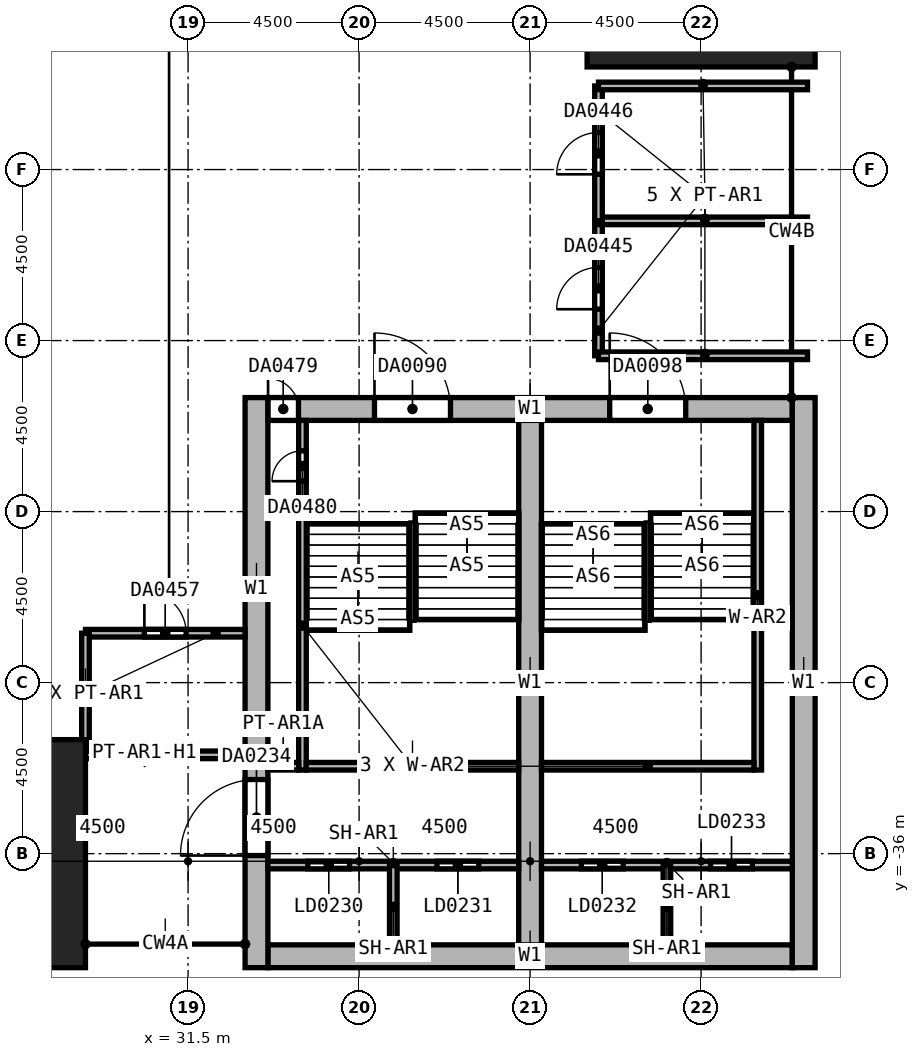
"""IFC4 building model, lengths in metres.
Left out: names, types, materials, properties, quantities, classifications, styles, units other than length and angle.
Written with IfcOpenShell. Run it as: python <this file> out.ifc"""

import sys

from ifc_helpers import new_model, si_unit, direction, frame, frame_2d, origin, origin_2d, place, context, subcontext, project, spatial, rectangle, extrude, element, fill, save


model = new_model("IFC4")
c1 = context("Model", 3, precision=1e-05, world=origin(), true_north=direction((0.0, 1.0)))
c2 = subcontext(c1, "Body", "Model", "MODEL_VIEW")
j1 = project(units=[si_unit("LENGTHUNIT", "METRE"), si_unit("PLANEANGLEUNIT", "RADIAN")], contexts=[c1])
p1 = place(None, origin())
s1 = spatial("IfcSite", under=j1, at=p1, CompositionType="ELEMENT")
p2 = place(p1, origin())
s2 = spatial("IfcBuilding", under=s1, at=p2, CompositionType="ELEMENT")
p3 = place(p2, frame((0.0, 0.0, 37.0)))
s3 = spatial("IfcBuildingStorey", under=s2, at=p3, CompositionType="ELEMENT", Elevation=37.0)
for number, where, z_axis, x_axis in (
    (1, (27.0, -36.0, 0.0), (0.0, 0.0, 1.0), (1.0, 0.0, 0.0)),
    (2, (45.0, -13.5, 0.0), (0.0, 0.0, 1.0), (0.0, 1.0, 0.0)),
):
    element("IfcColumn", number, at=place(p3, frame(where, z_axis=z_axis, x_axis=x_axis)), inside=s3, PredefinedType="COLUMN", context=c2, shape_type="SweptSolid", body=[
        extrude(rectangle(XDim=3.6, YDim=6.0, at=origin_2d()), origin(), (0.0, 0.0, 1.0), 5.8),
    ])
p4 = place(p3, frame((33.6, -24.3, 0.0), z_axis=(0.0, 0.0, 1.0), x_axis=(1.0, 0.0, 0.0)))
e3 = element("IfcWall", 3, at=p4, inside=s3, PredefinedType="SHEAR", context=c2, shape_type="SweptSolid", body=[
    extrude(rectangle(XDim=13.8, YDim=0.6, at=frame_2d((6.9, 0.0))), origin(), (0.0, 0.0, 1.0), 7.0),
])
p5 = place(p4, frame((2.805, 0.0, 0.0)))
e4 = element("IfcOpeningElement", 4, at=p5, cuts=e3, PredefinedType="OPENING", context=c2, shape_type="SweptSolid", body=[
    extrude(rectangle(XDim=2.0, YDim=2.4, at=frame_2d((1.0, 1.2))), frame((0.0, 0.3, 0.0), z_axis=(0.0, -1.0, 0.0), x_axis=(1.0, 0.0, 0.0)), (0.0, 0.0, 1.0), 0.6),
])
p6 = place(p4, frame((8.995, 0.0, 0.0)))
e5 = element("IfcOpeningElement", 5, at=p6, cuts=e3, PredefinedType="OPENING", context=c2, shape_type="SweptSolid", body=[
    extrude(rectangle(XDim=2.0, YDim=2.4, at=frame_2d((1.0, 1.2))), frame((0.0, 0.3, 0.0), z_axis=(0.0, -1.0, 0.0), x_axis=(1.0, 0.0, 0.0)), (0.0, 0.0, 1.0), 0.6),
])
p7 = place(p4, frame((0.005, 0.0, 0.0)))
e6 = element("IfcOpeningElement", 6, at=p7, cuts=e3, PredefinedType="OPENING", context=c2, shape_type="SweptSolid", body=[
    extrude(rectangle(XDim=0.8, YDim=2.1, at=frame_2d((0.4, 1.05))), frame((0.0, 0.3, 0.0), z_axis=(0.0, -1.0, 0.0), x_axis=(1.0, 0.0, 0.0)), (0.0, 0.0, 1.0), 0.6),
])
p8 = place(p3, frame((33.6, -38.7, 0.0), z_axis=(0.0, 0.0, 1.0), x_axis=(1.0, 0.0, 0.0)))
e7 = element("IfcWall", 7, at=p8, inside=s3, PredefinedType="SHEAR", context=c2, shape_type="SweptSolid", body=[
    extrude(rectangle(XDim=13.8, YDim=0.6, at=frame_2d((6.9, 0.0))), origin(), (0.0, 0.0, 1.0), 7.0),
])
p9 = place(p3, frame((33.3, -39.0, 0.0), z_axis=(0.0, 0.0, 1.0), x_axis=(0.0, 1.0, 0.0)))
e8 = element("IfcWall", 8, at=p9, inside=s3, PredefinedType="SHEAR", context=c2, shape_type="SweptSolid", body=[
    extrude(rectangle(XDim=15.0, YDim=0.6, at=frame_2d((7.5, 0.0))), origin(), (0.0, 0.0, 1.0), 7.0),
])
p10 = place(p9, frame((2.95, 0.0, 0.0)))
e9 = element("IfcOpeningElement", 9, at=p10, cuts=e8, PredefinedType="OPENING", context=c2, shape_type="SweptSolid", body=[
    extrude(rectangle(XDim=2.0, YDim=2.4, at=frame_2d((1.0, 1.2))), frame((0.0, 0.3, 0.0), z_axis=(0.0, -1.0, 0.0), x_axis=(1.0, 0.0, 0.0)), (0.0, 0.0, 1.0), 0.6),
])
p11 = place(p3, frame((47.7, -39.0, 0.0), z_axis=(0.0, 0.0, 1.0), x_axis=(0.0, 1.0, 0.0)))
e10 = element("IfcWall", 10, at=p11, inside=s3, PredefinedType="SHEAR", context=c2, shape_type="SweptSolid", body=[
    extrude(rectangle(XDim=15.0, YDim=0.6, at=frame_2d((7.5, 0.0))), origin(), (0.0, 0.0, 1.0), 7.0),
])
p12 = place(p3, frame((40.5, -38.4, 0.0), z_axis=(0.0, 0.0, 1.0), x_axis=(0.0, 1.0, 0.0)))
e11 = element("IfcWall", 11, at=p12, inside=s3, PredefinedType="SHEAR", context=c2, shape_type="SweptSolid", body=[
    extrude(rectangle(XDim=13.8, YDim=0.6, at=frame_2d((6.9, 0.0))), origin(), (0.0, 0.0, 1.0), 7.0),
])
p13 = place(p3, frame((34.51, -33.8, 0.0), z_axis=(0.0, 0.0, 1.0), x_axis=(0.0, 1.0, 0.0)))
e12 = element("IfcWall", 12, at=p13, inside=s3, PredefinedType="SOLIDWALL", context=c2, shape_type="SweptSolid", body=[
    extrude(rectangle(XDim=9.2, YDim=0.2, at=frame_2d((4.6, 0.0))), origin(), (0.0, 0.0, 1.0), 7.0),
])
p14 = place(p13, frame((7.6, 0.0, 0.0)))
e13 = element("IfcOpeningElement", 13, at=p14, cuts=e12, PredefinedType="OPENING", context=c2, shape_type="SweptSolid", body=[
    extrude(rectangle(XDim=0.8, YDim=2.1, at=frame_2d((0.4, 1.05))), frame((0.0, 0.1, 0.0), z_axis=(0.0, -1.0, 0.0), x_axis=(1.0, 0.0, 0.0)), (0.0, 0.0, 1.0), 0.2),
])
p15 = place(p3, frame((34.61, -33.7, 0.0), z_axis=(0.0, 0.0, 1.0), x_axis=(1.0, 0.0, 0.0)))
e14 = element("IfcWall", 14, at=p15, inside=s3, PredefinedType="SOLIDWALL", context=c2, shape_type="SweptSolid", body=[
    extrude(rectangle(XDim=5.59, YDim=0.2, at=frame_2d((2.795, 0.0))), origin(), (0.0, 0.0, 1.0), 7.0),
])
p16 = place(p3, frame((46.49, -33.8, 0.0), z_axis=(0.0, 0.0, 1.0), x_axis=(0.0, 1.0, 0.0)))
e15 = element("IfcWall", 15, at=p16, inside=s3, PredefinedType="SOLIDWALL", context=c2, shape_type="SweptSolid", body=[
    extrude(rectangle(XDim=9.2, YDim=0.2, at=frame_2d((4.6, 0.0))), origin(), (0.0, 0.0, 1.0), 7.0),
])
p17 = place(p3, frame((40.8, -33.7, 0.0), z_axis=(0.0, 0.0, 1.0), x_axis=(1.0, 0.0, 0.0)))
e16 = element("IfcWall", 16, at=p17, inside=s3, PredefinedType="SOLIDWALL", context=c2, shape_type="SweptSolid", body=[
    extrude(rectangle(XDim=5.59, YDim=0.2, at=frame_2d((2.795, 0.0))), origin(), (0.0, 0.0, 1.0), 7.0),
])
p18 = place(p3, frame((33.6, -36.3, 0.0), z_axis=(0.0, 0.0, 1.0), x_axis=(1.0, 0.0, 0.0)))
e17 = element("IfcWall", 17, at=p18, inside=s3, PredefinedType="SHEAR", context=c2, shape_type="SweptSolid", body=[
    extrude(rectangle(XDim=6.6, YDim=0.2, at=frame_2d((3.3, 0.0))), origin(), (0.0, 0.0, 1.0), 7.0),
])
p19 = place(p18, frame((1.05, 0.0, 0.0)))
e18 = element("IfcOpeningElement", 18, at=p19, cuts=e17, PredefinedType="OPENING", context=c2, shape_type="SweptSolid", body=[
    extrude(rectangle(XDim=1.1, YDim=2.4, at=frame_2d((0.55, 1.2))), frame((0.0, 0.1, 0.0), z_axis=(0.0, -1.0, 0.0), x_axis=(1.0, 0.0, 0.0)), (0.0, 0.0, 1.0), 0.2),
])
p20 = place(p18, frame((4.45, 0.0, 0.0)))
e19 = element("IfcOpeningElement", 19, at=p20, cuts=e17, PredefinedType="OPENING", context=c2, shape_type="SweptSolid", body=[
    extrude(rectangle(XDim=1.1, YDim=2.4, at=frame_2d((0.55, 1.2))), frame((0.0, 0.1, 0.0), z_axis=(0.0, -1.0, 0.0), x_axis=(1.0, 0.0, 0.0)), (0.0, 0.0, 1.0), 0.2),
])
p21 = place(p3, frame((40.8, -36.3, 0.0), z_axis=(0.0, 0.0, 1.0), x_axis=(1.0, 0.0, 0.0)))
e20 = element("IfcWall", 20, at=p21, inside=s3, PredefinedType="SHEAR", context=c2, shape_type="SweptSolid", body=[
    extrude(rectangle(XDim=6.6, YDim=0.2, at=frame_2d((3.3, 0.0))), origin(), (0.0, 0.0, 1.0), 7.0),
])
p22 = place(p21, frame((1.05, 0.0, 0.0)))
e21 = element("IfcOpeningElement", 21, at=p22, cuts=e20, PredefinedType="OPENING", context=c2, shape_type="SweptSolid", body=[
    extrude(rectangle(XDim=1.1, YDim=2.4, at=frame_2d((0.55, 1.2))), frame((0.0, 0.1, 0.0), z_axis=(0.0, -1.0, 0.0), x_axis=(1.0, 0.0, 0.0)), (0.0, 0.0, 1.0), 0.2),
])
p23 = place(p21, frame((4.45, 0.0, 0.0)))
e22 = element("IfcOpeningElement", 22, at=p23, cuts=e20, PredefinedType="OPENING", context=c2, shape_type="SweptSolid", body=[
    extrude(rectangle(XDim=1.1, YDim=2.4, at=frame_2d((0.55, 1.2))), frame((0.0, 0.1, 0.0), z_axis=(0.0, -1.0, 0.0), x_axis=(1.0, 0.0, 0.0)), (0.0, 0.0, 1.0), 0.2),
])
for number, where, z_axis, x_axis in (
    (23, (36.9, -38.4, 0.0), (0.0, 0.0, 1.0), (0.0, 1.0, 0.0)),
    (24, (44.1, -38.4, 0.0), (0.0, 0.0, 1.0), (0.0, 1.0, 0.0)),
):
    element("IfcWall", number, at=place(p3, frame(where, z_axis=z_axis, x_axis=x_axis)), inside=s3, PredefinedType="SHEAR", context=c2, shape_type="SweptSolid", body=[
        extrude(rectangle(XDim=2.1, YDim=0.2, at=frame_2d((1.05, 0.0))), origin(), (0.0, 0.0, 1.0), 7.0),
    ])
p24 = place(p3, frame((42.3, -22.9, 0.0), z_axis=(0.0, 0.0, 1.0), x_axis=(0.0, 1.0, 0.0)))
e25 = element("IfcWall", 25, at=p24, inside=s3, PredefinedType="PARTITIONING", context=c2, shape_type="SweptSolid", body=[
    extrude(rectangle(XDim=3.55, YDim=0.2, at=frame_2d((1.775, 0.0))), origin(), (0.0, 0.0, 1.0), 6.7),
])
p25 = place(p24, frame((1.225, 0.0, 0.0)))
e26 = element("IfcOpeningElement", 26, at=p25, cuts=e25, PredefinedType="OPENING", context=c2, shape_type="SweptSolid", body=[
    extrude(rectangle(XDim=1.1, YDim=2.4, at=frame_2d((0.55, 1.2))), frame((0.0, 0.1, 0.0), z_axis=(0.0, -1.0, 0.0), x_axis=(1.0, 0.0, 0.0)), (0.0, 0.0, 1.0), 0.2),
])
for number, where, z_axis, x_axis in (
    (27, (42.3, -22.9, 0.0), (0.0, 0.0, 1.0), (1.0, 0.0, 0.0)),
    (28, (42.3, -19.35, 0.0), (0.0, 0.0, 1.0), (1.0, 0.0, 0.0)),
):
    element("IfcWall", number, at=place(p3, frame(where, z_axis=z_axis, x_axis=x_axis)), inside=s3, PredefinedType="PARTITIONING", context=c2, shape_type="SweptSolid", body=[
        extrude(rectangle(XDim=5.5, YDim=0.2, at=frame_2d((2.75, 0.0))), origin(), (0.0, 0.0, 1.0), 6.7),
    ])
p26 = place(p3, frame((42.3, -19.35, 0.0), z_axis=(0.0, 0.0, 1.0), x_axis=(0.0, 1.0, 0.0)))
e29 = element("IfcWall", 29, at=p26, inside=s3, PredefinedType="PARTITIONING", context=c2, shape_type="SweptSolid", body=[
    extrude(rectangle(XDim=3.55, YDim=0.2, at=frame_2d((1.775, 0.0))), origin(), (0.0, 0.0, 1.0), 6.7),
])
p27 = place(p26, frame((1.225, 0.0, 0.0)))
e30 = element("IfcOpeningElement", 30, at=p27, cuts=e29, PredefinedType="OPENING", context=c2, shape_type="SweptSolid", body=[
    extrude(rectangle(XDim=1.1, YDim=2.4, at=frame_2d((0.55, 1.2))), frame((0.0, 0.1, 0.0), z_axis=(0.0, -1.0, 0.0), x_axis=(1.0, 0.0, 0.0)), (0.0, 0.0, 1.0), 0.2),
])
p28 = place(p3, frame((42.3, -15.8, 0.0), z_axis=(0.0, 0.0, 1.0), x_axis=(1.0, 0.0, 0.0)))
e31 = element("IfcWall", 31, at=p28, inside=s3, PredefinedType="PARTITIONING", context=c2, shape_type="SweptSolid", body=[
    extrude(rectangle(XDim=5.5, YDim=0.2, at=frame_2d((2.75, 0.0))), origin(), (0.0, 0.0, 1.0), 6.7),
])
p29 = place(p3, frame((28.8, -30.2, 0.0), z_axis=(0.0, 0.0, 1.0), x_axis=(1.0, 0.0, 0.0)))
e32 = element("IfcWall", 32, at=p29, inside=s3, PredefinedType="PARTITIONING", context=c2, shape_type="SweptSolid", body=[
    extrude(rectangle(XDim=4.2, YDim=0.2, at=frame_2d((2.1, 0.0))), origin(), (0.0, 0.0, 1.0), 6.7),
])
p30 = place(p29, frame((1.55, 0.0, 0.0)))
e33 = element("IfcOpeningElement", 33, at=p30, cuts=e32, PredefinedType="OPENING", context=c2, shape_type="SweptSolid", body=[
    extrude(rectangle(XDim=1.1, YDim=2.4, at=frame_2d((0.55, 1.2))), frame((0.0, 0.1, 0.0), z_axis=(0.0, -1.0, 0.0), x_axis=(1.0, 0.0, 0.0)), (0.0, 0.0, 1.0), 0.2),
])
p31 = place(p3, frame((28.8, -33.4, 0.0), z_axis=(0.0, 0.0, 1.0), x_axis=(0.0, 1.0, 0.0)))
e34 = element("IfcWall", 34, at=p31, inside=s3, PredefinedType="PARTITIONING", context=c2, shape_type="SweptSolid", body=[
    extrude(rectangle(XDim=3.2, YDim=0.2, at=frame_2d((1.6, 0.0))), origin(), (0.0, 0.0, 1.0), 6.7),
])
p32 = place(p3, frame((28.8, -33.4, 0.0), z_axis=(0.0, 0.0, 1.0), x_axis=(1.0, 0.0, 0.0)))
e35 = element("IfcWall", 35, at=p32, inside=s3, PredefinedType="PARTITIONING", context=c2, shape_type="SweptSolid", body=[
    extrude(rectangle(XDim=4.2, YDim=0.2, at=frame_2d((2.1, 0.0))), origin(), (0.0, 0.0, 1.0), 6.089),
])
p33 = place(p3, frame((33.6, -33.7, 0.0), z_axis=(0.0, 0.0, 1.0), x_axis=(1.0, 0.0, 0.0)))
e36 = element("IfcWall", 36, at=p33, inside=s3, PredefinedType="PARTITIONING", context=c2, shape_type="SweptSolid", body=[
    extrude(rectangle(XDim=0.81, YDim=0.2, at=frame_2d((0.405, 0.0))), origin(), (0.0, 0.0, 1.0), 7.0),
])
p34 = place(p5, frame((2.0, 0.0, 0.0), z_axis=(0.0, 0.0, 1.0), x_axis=(-1.0, 0.0, 0.0)))
e37 = element("IfcDoor", 37, at=p34, inside=s3, OperationType="DOUBLE_DOOR_SINGLE_SWING", PredefinedType="DOOR", context=c2, shape_type="SweptSolid", body=[
    extrude(rectangle(XDim=2.0, YDim=2.4, at=frame_2d((1.0, 1.2))), frame((0.0, 0.025, 0.0), z_axis=(0.0, -1.0, 0.0), x_axis=(1.0, 0.0, 0.0)), (0.0, 0.0, 1.0), 0.05),
])
fill(e4, e37)
p35 = place(p6, frame((2.0, 0.0, 0.0), z_axis=(0.0, 0.0, 1.0), x_axis=(-1.0, 0.0, 0.0)))
e38 = element("IfcDoor", 38, at=p35, inside=s3, OperationType="DOUBLE_DOOR_SINGLE_SWING", PredefinedType="DOOR", context=c2, shape_type="SweptSolid", body=[
    extrude(rectangle(XDim=2.0, YDim=2.4, at=frame_2d((1.0, 1.2))), frame((0.0, 0.025, 0.0), z_axis=(0.0, -1.0, 0.0), x_axis=(1.0, 0.0, 0.0)), (0.0, 0.0, 1.0), 0.05),
])
fill(e5, e38)
p36 = place(p19, frame((1.1, 0.0, 0.0), z_axis=(0.0, 0.0, 1.0), x_axis=(-1.0, 0.0, 0.0)))
e39 = element("IfcDoor", 39, at=p36, inside=s3, OperationType="DOUBLE_DOOR_SLIDING", PredefinedType="DOOR", context=c2, shape_type="SweptSolid", body=[
    extrude(rectangle(XDim=1.1, YDim=2.4, at=frame_2d((0.55, 1.2))), frame((0.0, 0.025, 0.0), z_axis=(0.0, -1.0, 0.0), x_axis=(1.0, 0.0, 0.0)), (0.0, 0.0, 1.0), 0.05),
])
fill(e18, e39)
p37 = place(p20, frame((1.1, 0.0, 0.0), z_axis=(0.0, 0.0, 1.0), x_axis=(-1.0, 0.0, 0.0)))
e40 = element("IfcDoor", 40, at=p37, inside=s3, OperationType="DOUBLE_DOOR_SLIDING", PredefinedType="DOOR", context=c2, shape_type="SweptSolid", body=[
    extrude(rectangle(XDim=1.1, YDim=2.4, at=frame_2d((0.55, 1.2))), frame((0.0, 0.025, 0.0), z_axis=(0.0, -1.0, 0.0), x_axis=(1.0, 0.0, 0.0)), (0.0, 0.0, 1.0), 0.05),
])
fill(e19, e40)
p38 = place(p22, frame((1.1, 0.0, 0.0), z_axis=(0.0, 0.0, 1.0), x_axis=(-1.0, 0.0, 0.0)))
e41 = element("IfcDoor", 41, at=p38, inside=s3, OperationType="DOUBLE_DOOR_SLIDING", PredefinedType="DOOR", context=c2, shape_type="SweptSolid", body=[
    extrude(rectangle(XDim=1.1, YDim=2.4, at=frame_2d((0.55, 1.2))), frame((0.0, 0.025, 0.0), z_axis=(0.0, -1.0, 0.0), x_axis=(1.0, 0.0, 0.0)), (0.0, 0.0, 1.0), 0.05),
])
fill(e21, e41)
p39 = place(p23, frame((1.1, 0.0, 0.0), z_axis=(0.0, 0.0, 1.0), x_axis=(-1.0, 0.0, 0.0)))
e42 = element("IfcDoor", 42, at=p39, inside=s3, OperationType="DOUBLE_DOOR_SLIDING", PredefinedType="DOOR", context=c2, shape_type="SweptSolid", body=[
    extrude(rectangle(XDim=1.1, YDim=2.4, at=frame_2d((0.55, 1.2))), frame((0.0, 0.025, 0.0), z_axis=(0.0, -1.0, 0.0), x_axis=(1.0, 0.0, 0.0)), (0.0, 0.0, 1.0), 0.05),
])
fill(e22, e42)
p40 = place(p10, origin())
e43 = element("IfcDoor", 43, at=p40, inside=s3, OperationType="DOUBLE_DOOR_SINGLE_SWING", PredefinedType="DOOR", context=c2, shape_type="SweptSolid", body=[
    extrude(rectangle(XDim=2.0, YDim=2.4, at=frame_2d((1.0, 1.2))), frame((0.0, 0.025, 0.0), z_axis=(0.0, -1.0, 0.0), x_axis=(1.0, 0.0, 0.0)), (0.0, 0.0, 1.0), 0.05),
])
fill(e9, e43)
p41 = place(p25, origin())
e44 = element("IfcDoor", 44, at=p41, inside=s3, OperationType="DOUBLE_DOOR_SINGLE_SWING", PredefinedType="DOOR", context=c2, shape_type="SweptSolid", body=[
    extrude(rectangle(XDim=1.1, YDim=2.4, at=frame_2d((0.55, 1.2))), frame((0.0, 0.025, 0.0), z_axis=(0.0, -1.0, 0.0), x_axis=(1.0, 0.0, 0.0)), (0.0, 0.0, 1.0), 0.05),
])
fill(e26, e44)
p42 = place(p27, origin())
e45 = element("IfcDoor", 45, at=p42, inside=s3, OperationType="DOUBLE_DOOR_SINGLE_SWING", PredefinedType="DOOR", context=c2, shape_type="SweptSolid", body=[
    extrude(rectangle(XDim=1.1, YDim=2.4, at=frame_2d((0.55, 1.2))), frame((0.0, 0.025, 0.0), z_axis=(0.0, -1.0, 0.0), x_axis=(1.0, 0.0, 0.0)), (0.0, 0.0, 1.0), 0.05),
])
fill(e30, e45)
p43 = place(p30, origin())
e46 = element("IfcDoor", 46, at=p43, inside=s3, OperationType="DOUBLE_DOOR_SINGLE_SWING", PredefinedType="DOOR", context=c2, shape_type="SweptSolid", body=[
    extrude(rectangle(XDim=1.1, YDim=2.4, at=frame_2d((0.55, 1.2))), frame((0.0, 0.025, 0.0), z_axis=(0.0, -1.0, 0.0), x_axis=(1.0, 0.0, 0.0)), (0.0, 0.0, 1.0), 0.05),
])
fill(e33, e46)
p44 = place(p7, origin())
e47 = element("IfcDoor", 47, at=p44, inside=s3, OperationType="SINGLE_SWING_LEFT", PredefinedType="DOOR", context=c2, shape_type="SweptSolid", body=[
    extrude(rectangle(XDim=0.8, YDim=2.1, at=frame_2d((0.4, 1.05))), frame((0.0, 0.025, 0.0), z_axis=(0.0, -1.0, 0.0), x_axis=(1.0, 0.0, 0.0)), (0.0, 0.0, 1.0), 0.05),
])
fill(e6, e47)
p45 = place(p14, origin())
e48 = element("IfcDoor", 48, at=p45, inside=s3, OperationType="SINGLE_SWING_LEFT", PredefinedType="DOOR", context=c2, shape_type="SweptSolid", body=[
    extrude(rectangle(XDim=0.8, YDim=2.1, at=frame_2d((0.4, 1.05))), frame((0.0, 0.025, 0.0), z_axis=(0.0, -1.0, 0.0), x_axis=(1.0, 0.0, 0.0)), (0.0, 0.0, 1.0), 0.05),
])
fill(e13, e48)
save(model, sys.argv[1])
